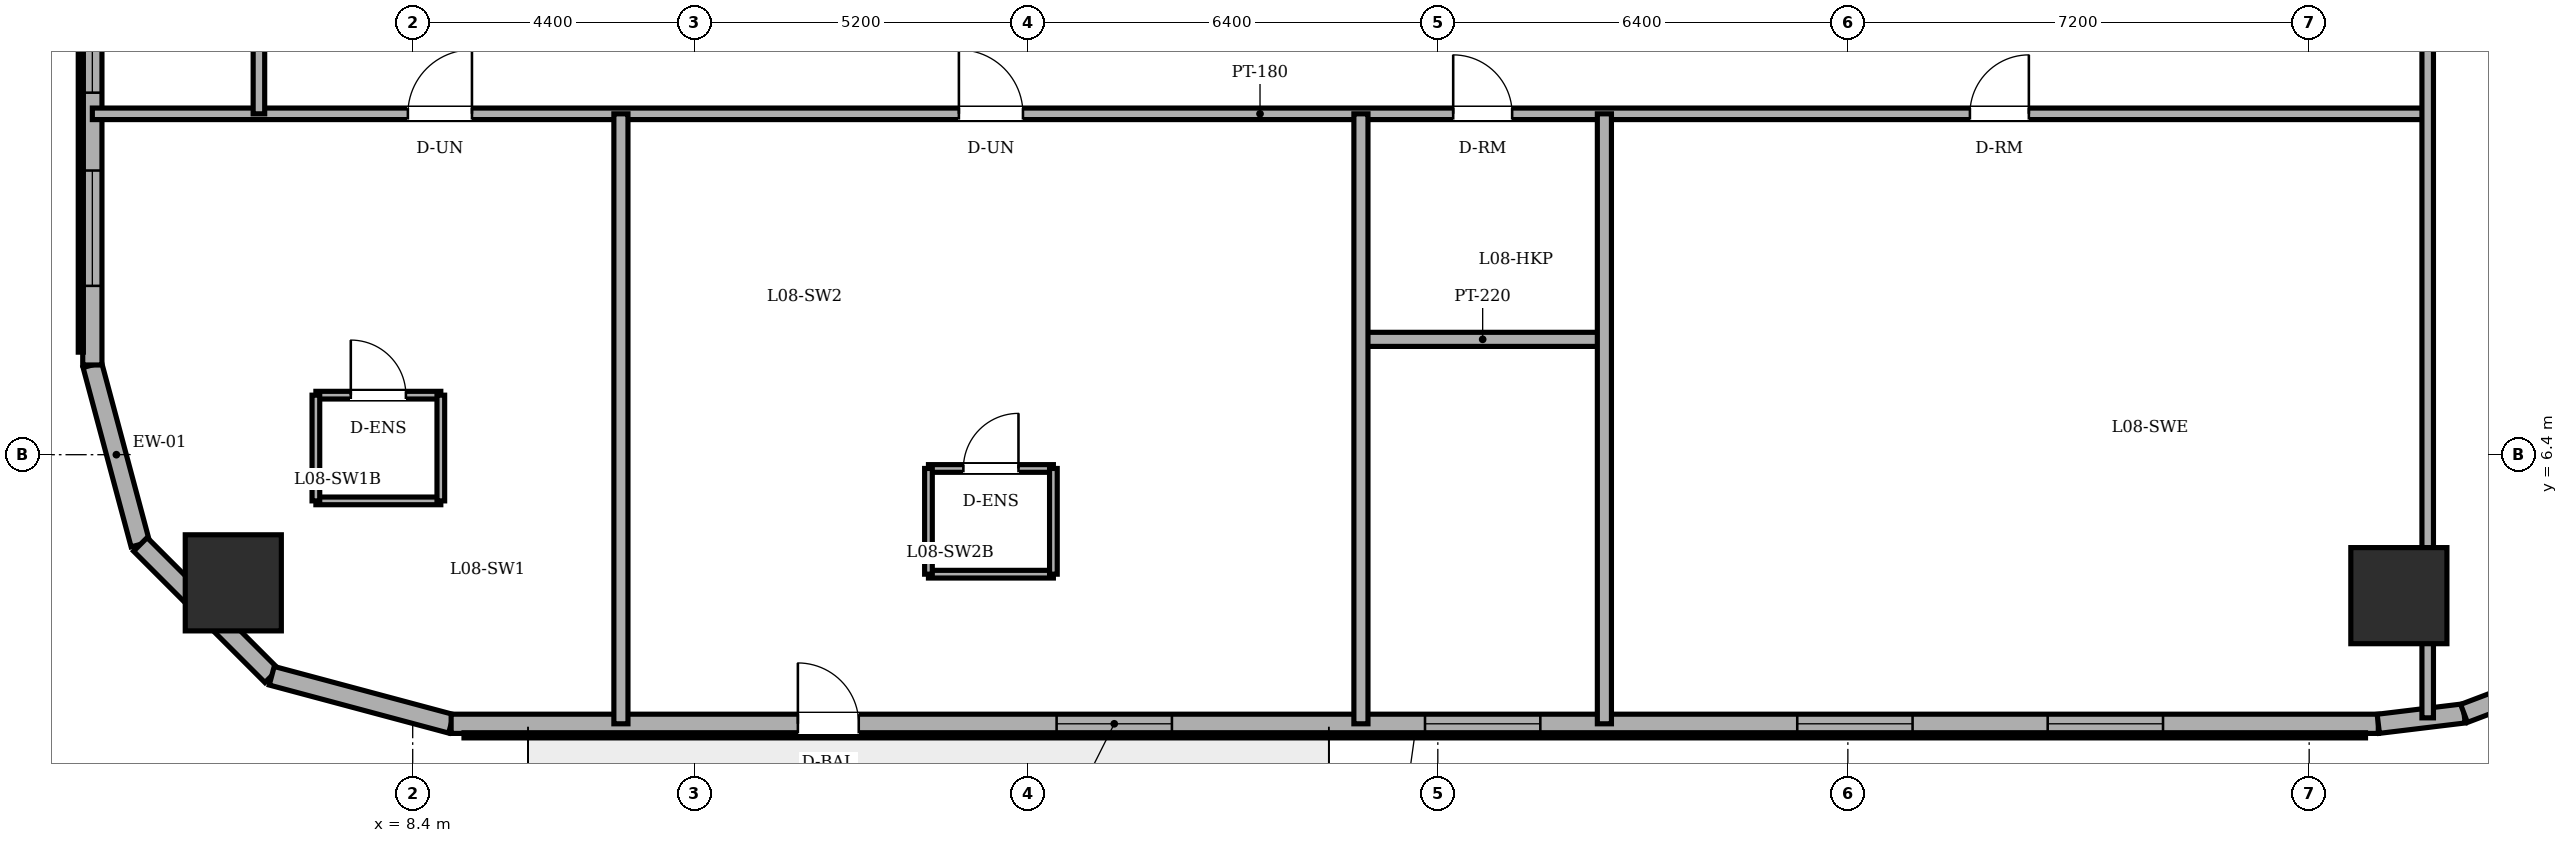
"""IFC4 building model, lengths in metres.
Left out: names, types, materials, properties, quantities, classifications, styles, units other than length and angle.
Written with IfcOpenShell. Run it as: python <this file> out.ifc"""

import sys

from ifc_helpers import new_model, si_unit, direction, frame, frame_2d, origin, origin_2d, place, context, subcontext, project, spatial, rectangle, circle, extrude, element, fill, save


model = new_model("IFC4")
c1 = context("Model", 3, precision=1e-05, world=origin(), true_north=direction((0.0, 1.0)))
c2 = subcontext(c1, "Body", "Model", "MODEL_VIEW")
j1 = project(units=[si_unit("LENGTHUNIT", "METRE"), si_unit("PLANEANGLEUNIT", "RADIAN")], contexts=[c1])
p1 = place(None, origin())
s1 = spatial("IfcSite", under=j1, at=p1, CompositionType="ELEMENT")
p2 = place(p1, origin())
s2 = spatial("IfcBuilding", under=s1, at=p2, CompositionType="ELEMENT")
p3 = place(p2, frame((0.0, 0.0, 32.4)))
s3 = spatial("IfcBuildingStorey", under=s2, at=p3, CompositionType="ELEMENT", Elevation=32.4)
for number, where, z_axis, x_axis in (
    (1, (5.6, 4.4, 0.0), (0.0, 0.0, 1.0), (1.0, 0.0, 0.0)),
    (2, (39.4, 4.2, 0.0), (0.0, 0.0, 1.0), (1.0, 0.0, 0.0)),
):
    element("IfcColumn", number, at=place(p3, frame(where, z_axis=z_axis, x_axis=x_axis)), inside=s3, PredefinedType="COLUMN", context=c2, shape_type="SweptSolid", body=[
        extrude(circle(Radius=0.75, at=origin_2d()), origin(), (0.0, 0.0, 1.0), 3.6),
    ])
p4 = place(p3, frame((3.4, 7.8, 0.0), z_axis=(0.0, 0.0, 1.0), x_axis=(0.258731875344, -0.96594917914, 0.0)))
e3 = element("IfcWall", 3, at=p4, inside=s3, PredefinedType="SOLIDWALL", context=c2, shape_type="SweptSolid", body=[
    extrude(rectangle(XDim=2.899, YDim=0.3, at=frame_2d((1.449, 0.0))), origin(), (0.0, 0.0, 1.0), 3.4),
])
p5 = place(p3, frame((4.15, 5.0, 0.0), z_axis=(0.0, 0.0, 1.0), x_axis=(0.707106781187, -0.707106781187, 0.0)))
e4 = element("IfcWall", 4, at=p5, inside=s3, PredefinedType="SOLIDWALL", context=c2, shape_type="SweptSolid", body=[
    extrude(rectangle(XDim=2.899, YDim=0.3, at=frame_2d((1.45, 0.0))), origin(), (0.0, 0.0, 1.0), 3.4),
])
p6 = place(p3, frame((6.2, 2.95, 0.0), z_axis=(0.0, 0.0, 1.0), x_axis=(0.96594917914, -0.258731875344, 0.0)))
e5 = element("IfcWall", 5, at=p6, inside=s3, PredefinedType="SOLIDWALL", context=c2, shape_type="SweptSolid", body=[
    extrude(rectangle(XDim=2.899, YDim=0.3, at=frame_2d((1.449, 0.0))), origin(), (0.0, 0.0, 1.0), 3.4),
])
p7 = place(p3, frame((9.0, 2.2, 0.0), z_axis=(0.0, 0.0, 1.0), x_axis=(1.0, 0.0, 0.0)))
e6 = element("IfcWall", 6, at=p7, inside=s3, PredefinedType="SOLIDWALL", context=c2, shape_type="SweptSolid", body=[
    extrude(rectangle(XDim=30.079, YDim=0.3, at=frame_2d((15.04, 0.0))), origin(), (0.0, 0.0, 1.0), 3.4),
])
p8 = place(p7, frame((5.412, 0.0, 0.0)))
e7 = element("IfcOpeningElement", 7, at=p8, cuts=e6, PredefinedType="OPENING", context=c2, shape_type="SweptSolid", body=[
    extrude(rectangle(XDim=0.95, YDim=2.2, at=frame_2d((0.475, 1.1))), frame((0.0, 0.16, 0.0), z_axis=(0.0, -1.0, 0.0), x_axis=(1.0, 0.0, 0.0)), (0.0, 0.0, 1.0), 0.32),
])
p9 = place(p7, frame((9.45, 0.0, 0.85)))
e8 = element("IfcOpeningElement", 8, at=p9, cuts=e6, PredefinedType="OPENING", context=c2, shape_type="SweptSolid", body=[
    extrude(rectangle(XDim=1.8, YDim=1.55, at=frame_2d((0.9, 0.775))), frame((0.0, 0.16, 0.0), z_axis=(0.0, -1.0, 0.0), x_axis=(1.0, 0.0, 0.0)), (0.0, 0.0, 1.0), 0.32),
])
p10 = place(p7, frame((15.2, 0.0, 0.85)))
e9 = element("IfcOpeningElement", 9, at=p10, cuts=e6, PredefinedType="OPENING", context=c2, shape_type="SweptSolid", body=[
    extrude(rectangle(XDim=1.8, YDim=1.55, at=frame_2d((0.9, 0.775))), frame((0.0, 0.16, 0.0), z_axis=(0.0, -1.0, 0.0), x_axis=(1.0, 0.0, 0.0)), (0.0, 0.0, 1.0), 0.32),
])
p11 = place(p7, frame((21.01, 0.0, 0.85)))
e10 = element("IfcOpeningElement", 10, at=p11, cuts=e6, PredefinedType="OPENING", context=c2, shape_type="SweptSolid", body=[
    extrude(rectangle(XDim=1.8, YDim=1.55, at=frame_2d((0.9, 0.775))), frame((0.0, 0.16, 0.0), z_axis=(0.0, -1.0, 0.0), x_axis=(1.0, 0.0, 0.0)), (0.0, 0.0, 1.0), 0.32),
])
p12 = place(p7, frame((24.919, 0.0, 0.85)))
e11 = element("IfcOpeningElement", 11, at=p12, cuts=e6, PredefinedType="OPENING", context=c2, shape_type="SweptSolid", body=[
    extrude(rectangle(XDim=1.8, YDim=1.55, at=frame_2d((0.9, 0.775))), frame((0.0, 0.16, 0.0), z_axis=(0.0, -1.0, 0.0), x_axis=(1.0, 0.0, 0.0)), (0.0, 0.0, 1.0), 0.32),
])
p13 = place(p3, frame((39.079, 2.2, 0.0), z_axis=(0.0, 0.0, 1.0), x_axis=(0.992739027259, 0.120288086515, 0.0)))
e12 = element("IfcWall", 12, at=p13, inside=s3, PredefinedType="SOLIDWALL", context=c2, shape_type="SweptSolid", body=[
    extrude(rectangle(XDim=1.348, YDim=0.3, at=frame_2d((0.674, 0.0))), origin(), (0.0, 0.0, 1.0), 3.4),
])
p14 = place(p3, frame((40.417, 2.362, 0.0), z_axis=(0.0, 0.0, 1.0), x_axis=(0.935156721165, 0.354234254216, 0.0)))
e13 = element("IfcWall", 13, at=p14, inside=s3, PredefinedType="SOLIDWALL", context=c2, shape_type="SweptSolid", body=[
    extrude(rectangle(XDim=1.349, YDim=0.3, at=frame_2d((0.675, 0.0))), origin(), (0.0, 0.0, 1.0), 3.4),
])
p15 = place(p3, frame((3.4, 40.2, 0.0), z_axis=(0.0, 0.0, 1.0), x_axis=(0.0, -1.0, 0.0)))
e14 = element("IfcWall", 14, at=p15, inside=s3, PredefinedType="SOLIDWALL", context=c2, shape_type="SweptSolid", body=[
    extrude(rectangle(XDim=32.4, YDim=0.3, at=frame_2d((16.2, 0.0))), origin(), (0.0, 0.0, 1.0), 3.4),
])
p16 = place(p15, frame((1.235, 0.0, 0.85)))
e15 = element("IfcOpeningElement", 15, at=p16, cuts=e14, PredefinedType="OPENING", context=c2, shape_type="SweptSolid", body=[
    extrude(rectangle(XDim=1.8, YDim=1.55, at=frame_2d((0.9, 0.775))), frame((0.0, 0.16, 0.0), z_axis=(0.0, -1.0, 0.0), x_axis=(1.0, 0.0, 0.0)), (0.0, 0.0, 1.0), 0.32),
])
p17 = place(p15, frame((4.25, 0.0, 0.85)))
e16 = element("IfcOpeningElement", 16, at=p17, cuts=e14, PredefinedType="OPENING", context=c2, shape_type="SweptSolid", body=[
    extrude(rectangle(XDim=1.8, YDim=1.55, at=frame_2d((0.9, 0.775))), frame((0.0, 0.16, 0.0), z_axis=(0.0, -1.0, 0.0), x_axis=(1.0, 0.0, 0.0)), (0.0, 0.0, 1.0), 0.32),
])
p18 = place(p15, frame((9.253, 0.0, 0.85)))
e17 = element("IfcOpeningElement", 17, at=p18, cuts=e14, PredefinedType="OPENING", context=c2, shape_type="SweptSolid", body=[
    extrude(rectangle(XDim=1.8, YDim=1.55, at=frame_2d((0.9, 0.775))), frame((0.0, 0.16, 0.0), z_axis=(0.0, -1.0, 0.0), x_axis=(1.0, 0.0, 0.0)), (0.0, 0.0, 1.0), 0.32),
])
p19 = place(p15, frame((13.027, 0.0, 0.85)))
e18 = element("IfcOpeningElement", 18, at=p19, cuts=e14, PredefinedType="OPENING", context=c2, shape_type="SweptSolid", body=[
    extrude(rectangle(XDim=1.8, YDim=1.55, at=frame_2d((0.9, 0.775))), frame((0.0, 0.16, 0.0), z_axis=(0.0, -1.0, 0.0), x_axis=(1.0, 0.0, 0.0)), (0.0, 0.0, 1.0), 0.32),
])
p20 = place(p15, frame((19.573, 0.0, 0.85)))
e19 = element("IfcOpeningElement", 19, at=p20, cuts=e14, PredefinedType="OPENING", context=c2, shape_type="SweptSolid", body=[
    extrude(rectangle(XDim=1.8, YDim=1.55, at=frame_2d((0.9, 0.775))), frame((0.0, 0.16, 0.0), z_axis=(0.0, -1.0, 0.0), x_axis=(1.0, 0.0, 0.0)), (0.0, 0.0, 1.0), 0.32),
])
p21 = place(p15, frame((22.347, 0.0, 0.85)))
e20 = element("IfcOpeningElement", 20, at=p21, cuts=e14, PredefinedType="OPENING", context=c2, shape_type="SweptSolid", body=[
    extrude(rectangle(XDim=1.8, YDim=1.55, at=frame_2d((0.9, 0.775))), frame((0.0, 0.16, 0.0), z_axis=(0.0, -1.0, 0.0), x_axis=(1.0, 0.0, 0.0)), (0.0, 0.0, 1.0), 0.32),
])
p22 = place(p15, frame((26.35, 0.0, 0.85)))
e21 = element("IfcOpeningElement", 21, at=p22, cuts=e14, PredefinedType="OPENING", context=c2, shape_type="SweptSolid", body=[
    extrude(rectangle(XDim=1.8, YDim=1.55, at=frame_2d((0.9, 0.775))), frame((0.0, 0.16, 0.0), z_axis=(0.0, -1.0, 0.0), x_axis=(1.0, 0.0, 0.0)), (0.0, 0.0, 1.0), 0.32),
])
p23 = place(p15, frame((29.365, 0.0, 0.85)))
e22 = element("IfcOpeningElement", 22, at=p23, cuts=e14, PredefinedType="OPENING", context=c2, shape_type="SweptSolid", body=[
    extrude(rectangle(XDim=1.8, YDim=1.55, at=frame_2d((0.9, 0.775))), frame((0.0, 0.16, 0.0), z_axis=(0.0, -1.0, 0.0), x_axis=(1.0, 0.0, 0.0)), (0.0, 0.0, 1.0), 0.32),
])
p24 = place(p3, frame((6.889, 7.329, 0.0), z_axis=(0.0, 0.0, 1.0), x_axis=(1.0, 0.0, 0.0)))
e23 = element("IfcWall", 23, at=p24, inside=s3, PredefinedType="PARTITIONING", context=c2, shape_type="SweptSolid", body=[
    extrude(rectangle(XDim=1.95, YDim=0.12, at=frame_2d((0.975, 0.0))), origin(), (0.0, 0.0, 1.0), 3.4),
])
p25 = place(p24, frame((0.545, 0.0, 0.0)))
e24 = element("IfcOpeningElement", 24, at=p25, cuts=e23, PredefinedType="OPENING", context=c2, shape_type="SweptSolid", body=[
    extrude(rectangle(XDim=0.86, YDim=2.1, at=frame_2d((0.43, 1.05))), frame((0.0, 0.07, 0.0), z_axis=(0.0, -1.0, 0.0), x_axis=(1.0, 0.0, 0.0)), (0.0, 0.0, 1.0), 0.14),
])
p26 = place(p3, frame((8.839, 5.679, 0.0), z_axis=(0.0, 0.0, 1.0), x_axis=(-1.0, 0.0, 0.0)))
e25 = element("IfcWall", 25, at=p26, inside=s3, PredefinedType="PARTITIONING", context=c2, shape_type="SweptSolid", body=[
    extrude(rectangle(XDim=1.95, YDim=0.12, at=frame_2d((0.975, 0.0))), origin(), (0.0, 0.0, 1.0), 3.4),
])
for number, where, z_axis, x_axis in (
    (26, (6.889, 7.329, 0.0), (0.0, 0.0, 1.0), (0.0, -1.0, 0.0)),
    (27, (8.839, 5.679, 0.0), (0.0, 0.0, 1.0), (0.0, 1.0, 0.0)),
):
    element("IfcWall", number, at=place(p3, frame(where, z_axis=z_axis, x_axis=x_axis)), inside=s3, PredefinedType="PARTITIONING", context=c2, shape_type="SweptSolid", body=[
        extrude(rectangle(XDim=1.65, YDim=0.12, at=frame_2d((0.825, 0.0))), origin(), (0.0, 0.0, 1.0), 3.4),
    ])
p27 = place(p3, frame((16.45, 6.185, 0.0), z_axis=(0.0, 0.0, 1.0), x_axis=(1.0, 0.0, 0.0)))
e28 = element("IfcWall", 28, at=p27, inside=s3, PredefinedType="PARTITIONING", context=c2, shape_type="SweptSolid", body=[
    extrude(rectangle(XDim=1.95, YDim=0.12, at=frame_2d((0.975, 0.0))), origin(), (0.0, 0.0, 1.0), 3.4),
])
p28 = place(p27, frame((0.545, 0.0, 0.0)))
e29 = element("IfcOpeningElement", 29, at=p28, cuts=e28, PredefinedType="OPENING", context=c2, shape_type="SweptSolid", body=[
    extrude(rectangle(XDim=0.86, YDim=2.1, at=frame_2d((0.43, 1.05))), frame((0.0, 0.07, 0.0), z_axis=(0.0, -1.0, 0.0), x_axis=(1.0, 0.0, 0.0)), (0.0, 0.0, 1.0), 0.14),
])
p29 = place(p3, frame((18.4, 4.535, 0.0), z_axis=(0.0, 0.0, 1.0), x_axis=(-1.0, 0.0, 0.0)))
e30 = element("IfcWall", 30, at=p29, inside=s3, PredefinedType="PARTITIONING", context=c2, shape_type="SweptSolid", body=[
    extrude(rectangle(XDim=1.95, YDim=0.12, at=frame_2d((0.975, 0.0))), origin(), (0.0, 0.0, 1.0), 2.882),
])
for number, where, z_axis, x_axis in (
    (31, (16.45, 6.185, 0.0), (0.0, 0.0, 1.0), (0.0, -1.0, 0.0)),
    (32, (18.4, 4.535, 0.0), (0.0, 0.0, 1.0), (0.0, 1.0, 0.0)),
):
    element("IfcWall", number, at=place(p3, frame(where, z_axis=z_axis, x_axis=x_axis)), inside=s3, PredefinedType="PARTITIONING", context=c2, shape_type="SweptSolid", body=[
        extrude(rectangle(XDim=1.65, YDim=0.12, at=frame_2d((0.825, 0.0))), origin(), (0.0, 0.0, 1.0), 3.4),
    ])
p30 = place(p3, frame((23.2, 8.2, 0.0), z_axis=(0.0, 0.0, 1.0), x_axis=(1.0, 0.0, 0.0)))
e33 = element("IfcWall", 33, at=p30, inside=s3, PredefinedType="PARTITIONING", context=c2, shape_type="SweptSolid", body=[
    extrude(rectangle(XDim=3.8, YDim=0.22, at=frame_2d((1.9, 0.0))), origin(), (0.0, 0.0, 1.0), 3.4),
])
p31 = place(p3, frame((3.4, 11.72, 0.0), z_axis=(0.0, 0.0, 1.0), x_axis=(1.0, 0.0, 0.0)))
e34 = element("IfcWall", 34, at=p31, inside=s3, PredefinedType="PARTITIONING", context=c2, shape_type="SweptSolid", body=[
    extrude(rectangle(XDim=36.45, YDim=0.18, at=frame_2d((18.225, 0.0))), origin(), (0.0, 0.0, 1.0), 3.4),
])
p32 = place(p31, frame((21.24, 0.0, 0.0)))
e35 = element("IfcOpeningElement", 35, at=p32, cuts=e34, PredefinedType="OPENING", context=c2, shape_type="SweptSolid", body=[
    extrude(rectangle(XDim=0.92, YDim=2.1, at=frame_2d((0.46, 1.05))), frame((0.0, 0.1, 0.0), z_axis=(0.0, -1.0, 0.0), x_axis=(1.0, 0.0, 0.0)), (0.0, 0.0, 1.0), 0.2),
])
p33 = place(p31, frame((4.925, 0.0, 0.0)))
e36 = element("IfcOpeningElement", 36, at=p33, cuts=e34, PredefinedType="OPENING", context=c2, shape_type="SweptSolid", body=[
    extrude(rectangle(XDim=1.0, YDim=2.15, at=frame_2d((0.5, 1.075))), frame((0.0, 0.1, 0.0), z_axis=(0.0, -1.0, 0.0), x_axis=(1.0, 0.0, 0.0)), (0.0, 0.0, 1.0), 0.2),
])
p34 = place(p31, frame((13.525, 0.0, 0.0)))
e37 = element("IfcOpeningElement", 37, at=p34, cuts=e34, PredefinedType="OPENING", context=c2, shape_type="SweptSolid", body=[
    extrude(rectangle(XDim=1.0, YDim=2.15, at=frame_2d((0.5, 1.075))), frame((0.0, 0.1, 0.0), z_axis=(0.0, -1.0, 0.0), x_axis=(1.0, 0.0, 0.0)), (0.0, 0.0, 1.0), 0.2),
])
p35 = place(p31, frame((29.305, 0.0, 0.0)))
e38 = element("IfcOpeningElement", 38, at=p35, cuts=e34, PredefinedType="OPENING", context=c2, shape_type="SweptSolid", body=[
    extrude(rectangle(XDim=0.92, YDim=2.1, at=frame_2d((0.46, 1.05))), frame((0.0, 0.1, 0.0), z_axis=(0.0, -1.0, 0.0), x_axis=(1.0, 0.0, 0.0)), (0.0, 0.0, 1.0), 0.2),
])
p36 = place(p3, frame((6.0, 11.72, 0.0), z_axis=(0.0, 0.0, 1.0), x_axis=(0.0, 1.0, 0.0)))
e39 = element("IfcWall", 39, at=p36, inside=s3, PredefinedType="PARTITIONING", context=c2, shape_type="SweptSolid", body=[
    extrude(rectangle(XDim=2.46, YDim=0.18, at=frame_2d((1.23, 0.0))), origin(), (0.0, 0.0, 1.0), 3.4),
])
for number, where, z_axis, x_axis in (
    (40, (11.65, 2.2, 0.0), (0.0, 0.0, 1.0), (0.0, 1.0, 0.0)),
    (41, (23.2, 2.2, 0.0), (0.0, 0.0, 1.0), (0.0, 1.0, 0.0)),
    (42, (27.0, 2.2, 0.0), (0.0, 0.0, 1.0), (0.0, 1.0, 0.0)),
):
    element("IfcWall", number, at=place(p3, frame(where, z_axis=z_axis, x_axis=x_axis)), inside=s3, PredefinedType="PARTITIONING", context=c2, shape_type="SweptSolid", body=[
        extrude(rectangle(XDim=9.52, YDim=0.22, at=frame_2d((4.76, 0.0))), origin(), (0.0, 0.0, 1.0), 3.4),
    ])
p37 = place(p3, frame((39.85, 2.293, 0.0), z_axis=(0.0, 0.0, 1.0), x_axis=(0.0, 1.0, 0.0)))
e43 = element("IfcWall", 43, at=p37, inside=s3, PredefinedType="PARTITIONING", context=c2, shape_type="SweptSolid", body=[
    extrude(rectangle(XDim=20.527, YDim=0.18, at=frame_2d((10.264, 0.0))), origin(), (0.0, 0.0, 1.0), 2.782),
])
p38 = place(p37, frame((14.257, 0.0, 0.0)))
e44 = element("IfcOpeningElement", 44, at=p38, cuts=e43, PredefinedType="OPENING", context=c2, shape_type="SweptSolid", body=[
    extrude(rectangle(XDim=0.92, YDim=2.1, at=frame_2d((0.46, 1.05))), frame((0.0, 0.1, 0.0), z_axis=(0.0, -1.0, 0.0), x_axis=(1.0, 0.0, 0.0)), (0.0, 0.0, 1.0), 0.2),
])
p39 = place(p8, origin())
e45 = element("IfcDoor", 45, at=p39, inside=s3, OperationType="SINGLE_SWING_LEFT", PredefinedType="DOOR", context=c2, shape_type="SweptSolid", body=[
    extrude(rectangle(XDim=0.95, YDim=2.2, at=frame_2d((0.475, 1.1))), frame((0.0, 0.025, 0.0), z_axis=(0.0, -1.0, 0.0), x_axis=(1.0, 0.0, 0.0)), (0.0, 0.0, 1.0), 0.05),
])
fill(e7, e45)
p40 = place(p9, origin())
e46 = element("IfcWindow", 46, at=p40, inside=s3, PartitioningType="DOUBLE_PANEL_VERTICAL", PredefinedType="WINDOW", context=c2, shape_type="SweptSolid", body=[
    extrude(rectangle(XDim=1.8, YDim=1.55, at=frame_2d((0.9, 0.775))), frame((0.0, 0.03, 0.0), z_axis=(0.0, -1.0, 0.0), x_axis=(1.0, 0.0, 0.0)), (0.0, 0.0, 1.0), 0.06),
])
fill(e8, e46)
p41 = place(p10, origin())
e47 = element("IfcWindow", 47, at=p41, inside=s3, PartitioningType="DOUBLE_PANEL_VERTICAL", PredefinedType="WINDOW", context=c2, shape_type="SweptSolid", body=[
    extrude(rectangle(XDim=1.8, YDim=1.55, at=frame_2d((0.9, 0.775))), frame((0.0, 0.03, 0.0), z_axis=(0.0, -1.0, 0.0), x_axis=(1.0, 0.0, 0.0)), (0.0, 0.0, 1.0), 0.06),
])
fill(e9, e47)
p42 = place(p11, origin())
e48 = element("IfcWindow", 48, at=p42, inside=s3, PartitioningType="DOUBLE_PANEL_VERTICAL", PredefinedType="WINDOW", context=c2, shape_type="SweptSolid", body=[
    extrude(rectangle(XDim=1.8, YDim=1.55, at=frame_2d((0.9, 0.775))), frame((0.0, 0.03, 0.0), z_axis=(0.0, -1.0, 0.0), x_axis=(1.0, 0.0, 0.0)), (0.0, 0.0, 1.0), 0.06),
])
fill(e10, e48)
p43 = place(p12, origin())
e49 = element("IfcWindow", 49, at=p43, inside=s3, PartitioningType="DOUBLE_PANEL_VERTICAL", PredefinedType="WINDOW", context=c2, shape_type="SweptSolid", body=[
    extrude(rectangle(XDim=1.8, YDim=1.55, at=frame_2d((0.9, 0.775))), frame((0.0, 0.03, 0.0), z_axis=(0.0, -1.0, 0.0), x_axis=(1.0, 0.0, 0.0)), (0.0, 0.0, 1.0), 0.06),
])
fill(e11, e49)
p44 = place(p22, origin())
e50 = element("IfcWindow", 50, at=p44, inside=s3, PartitioningType="DOUBLE_PANEL_VERTICAL", PredefinedType="WINDOW", context=c2, shape_type="SweptSolid", body=[
    extrude(rectangle(XDim=1.8, YDim=1.55, at=frame_2d((0.9, 0.775))), frame((0.0, 0.03, 0.0), z_axis=(0.0, -1.0, 0.0), x_axis=(1.0, 0.0, 0.0)), (0.0, 0.0, 1.0), 0.06),
])
fill(e21, e50)
p45 = place(p23, origin())
e51 = element("IfcWindow", 51, at=p45, inside=s3, PartitioningType="DOUBLE_PANEL_VERTICAL", PredefinedType="WINDOW", context=c2, shape_type="SweptSolid", body=[
    extrude(rectangle(XDim=1.8, YDim=1.55, at=frame_2d((0.9, 0.775))), frame((0.0, 0.03, 0.0), z_axis=(0.0, -1.0, 0.0), x_axis=(1.0, 0.0, 0.0)), (0.0, 0.0, 1.0), 0.06),
])
fill(e22, e51)
p46 = place(p25, origin())
e52 = element("IfcDoor", 52, at=p46, inside=s3, OperationType="SINGLE_SWING_LEFT", PredefinedType="DOOR", context=c2, shape_type="SweptSolid", body=[
    extrude(rectangle(XDim=0.86, YDim=2.1, at=frame_2d((0.43, 1.05))), frame((0.0, 0.025, 0.0), z_axis=(0.0, -1.0, 0.0), x_axis=(1.0, 0.0, 0.0)), (0.0, 0.0, 1.0), 0.05),
])
fill(e24, e52)
p47 = place(p28, origin())
e53 = element("IfcDoor", 53, at=p47, inside=s3, OperationType="SINGLE_SWING_RIGHT", PredefinedType="DOOR", context=c2, shape_type="SweptSolid", body=[
    extrude(rectangle(XDim=0.86, YDim=2.1, at=frame_2d((0.43, 1.05))), frame((0.0, 0.025, 0.0), z_axis=(0.0, -1.0, 0.0), x_axis=(1.0, 0.0, 0.0)), (0.0, 0.0, 1.0), 0.05),
])
fill(e29, e53)
p48 = place(p32, origin())
e54 = element("IfcDoor", 54, at=p48, inside=s3, OperationType="SINGLE_SWING_LEFT", PredefinedType="DOOR", context=c2, shape_type="SweptSolid", body=[
    extrude(rectangle(XDim=0.92, YDim=2.1, at=frame_2d((0.46, 1.05))), frame((0.0, 0.025, 0.0), z_axis=(0.0, -1.0, 0.0), x_axis=(1.0, 0.0, 0.0)), (0.0, 0.0, 1.0), 0.05),
])
fill(e35, e54)
p49 = place(p33, origin())
e55 = element("IfcDoor", 55, at=p49, inside=s3, OperationType="SINGLE_SWING_RIGHT", PredefinedType="DOOR", context=c2, shape_type="SweptSolid", body=[
    extrude(rectangle(XDim=1.0, YDim=2.15, at=frame_2d((0.5, 1.075))), frame((0.0, 0.025, 0.0), z_axis=(0.0, -1.0, 0.0), x_axis=(1.0, 0.0, 0.0)), (0.0, 0.0, 1.0), 0.05),
])
fill(e36, e55)
p50 = place(p34, origin())
e56 = element("IfcDoor", 56, at=p50, inside=s3, OperationType="SINGLE_SWING_LEFT", PredefinedType="DOOR", context=c2, shape_type="SweptSolid", body=[
    extrude(rectangle(XDim=1.0, YDim=2.15, at=frame_2d((0.5, 1.075))), frame((0.0, 0.025, 0.0), z_axis=(0.0, -1.0, 0.0), x_axis=(1.0, 0.0, 0.0)), (0.0, 0.0, 1.0), 0.05),
])
fill(e37, e56)
p51 = place(p35, origin())
e57 = element("IfcDoor", 57, at=p51, inside=s3, OperationType="SINGLE_SWING_RIGHT", PredefinedType="DOOR", context=c2, shape_type="SweptSolid", body=[
    extrude(rectangle(XDim=0.92, YDim=2.1, at=frame_2d((0.46, 1.05))), frame((0.0, 0.025, 0.0), z_axis=(0.0, -1.0, 0.0), x_axis=(1.0, 0.0, 0.0)), (0.0, 0.0, 1.0), 0.05),
])
fill(e38, e57)
save(model, sys.argv[1])
